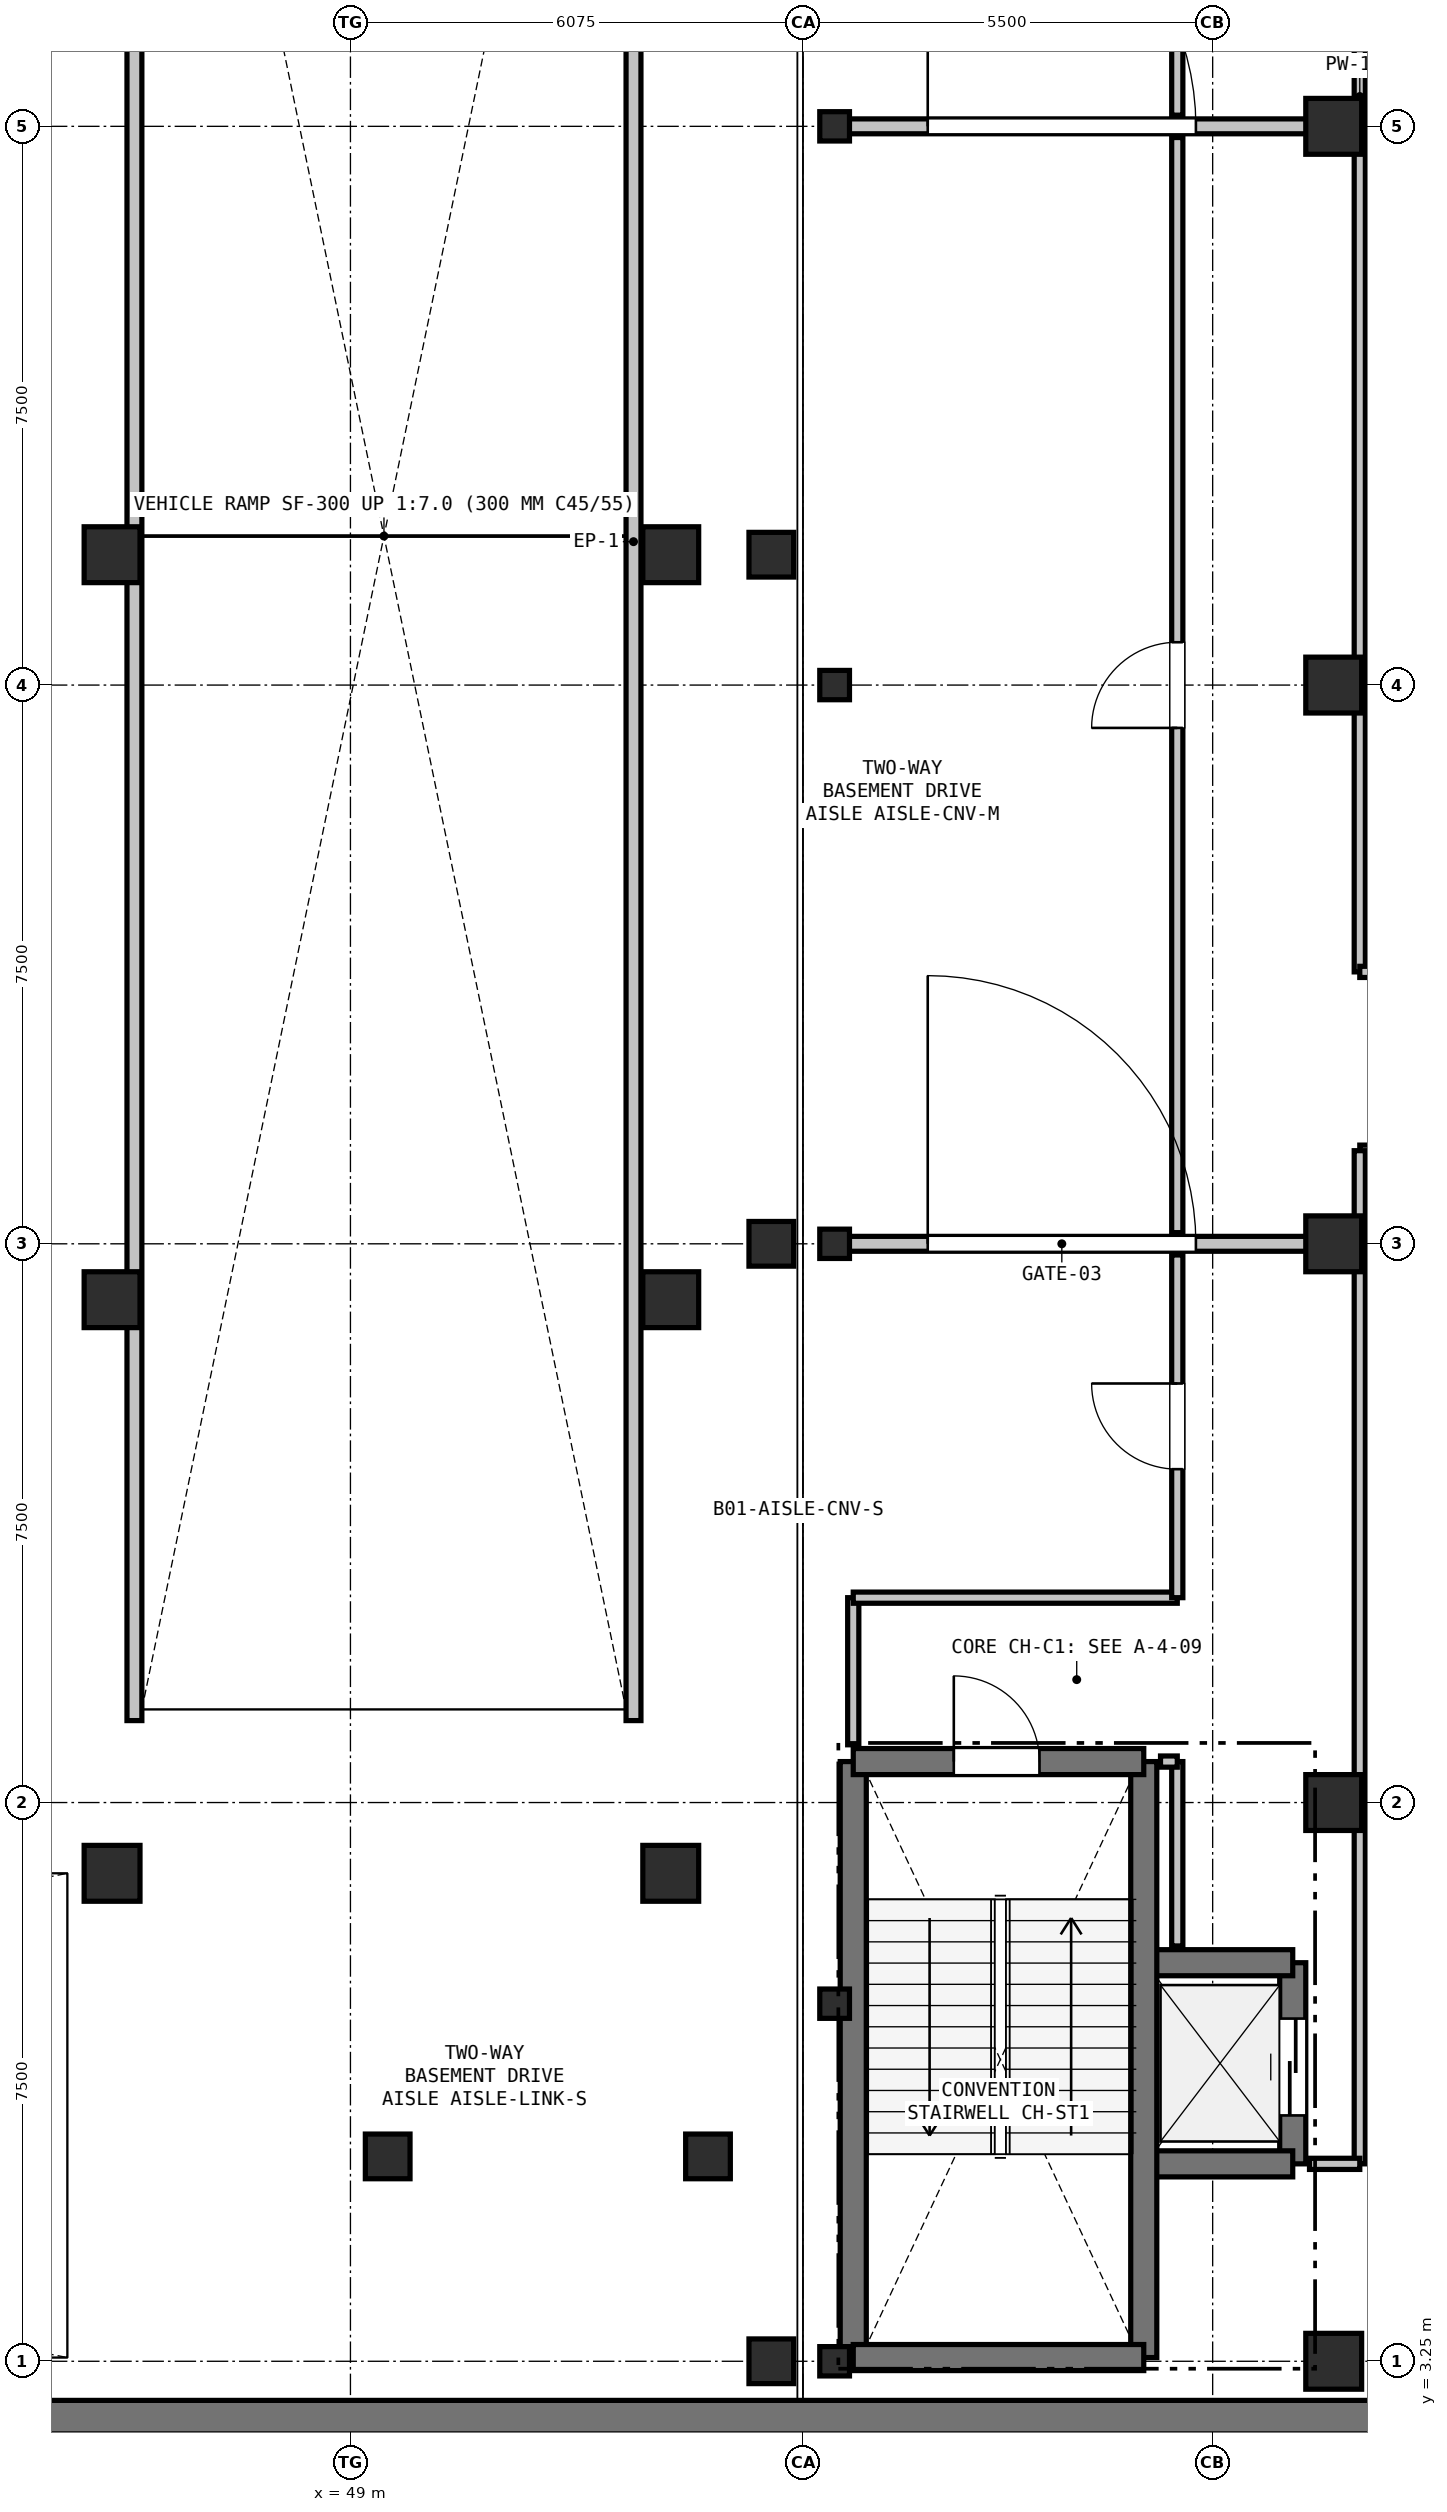
"""IFC4 building model, lengths in metres.
Left out: names, types, materials, properties, quantities, classifications, styles, units other than length and angle.
Written with IfcOpenShell. Run it as: python <this file> out.ifc"""

import sys

from ifc_helpers import new_model, si_unit, direction, frame, frame_2d, origin, origin_2d, place, context, subcontext, project, spatial, rectangle, i_section, extrude, element, fill, save


model = new_model("IFC4")
c1 = context("Model", 3, precision=1e-05, world=origin(), true_north=direction((0.0, 1.0)))
c2 = subcontext(c1, "Body", "Model", "MODEL_VIEW")
j1 = project(units=[si_unit("LENGTHUNIT", "METRE"), si_unit("PLANEANGLEUNIT", "RADIAN")], contexts=[c1])
p1 = place(None, origin())
s1 = spatial("IfcSite", under=j1, at=p1, CompositionType="ELEMENT")
p2 = place(p1, origin())
s2 = spatial("IfcBuilding", under=s1, at=p2, CompositionType="ELEMENT")
p3 = place(p2, frame((0.0, 0.0, -4.5)))
s3 = spatial("IfcBuildingStorey", under=s2, at=p3, CompositionType="ELEMENT", Elevation=-4.5)
p4 = place(p3, frame((-4.5, 2.5, 0.0), z_axis=(0.0, 0.0, 1.0), x_axis=(1.0, 0.0, 0.0)))
e1 = element("IfcWall", 1, at=p4, inside=s3, PredefinedType="USERDEFINED", context=c2, shape_type="SweptSolid", body=[
    extrude(rectangle(XDim=81.5, YDim=0.45, at=frame_2d((40.75, 0.0))), origin(), (0.0, 0.0, 1.0), 4.5),
])
for number, where, z_axis, x_axis in (
    (2, (49.5, 6.0, 0.0), (0.0, 0.0, 1.0), (1.0, 0.0, 0.0)),
    (3, (53.8, 6.0, 0.0), (0.0, 0.0, 1.0), (1.0, 0.0, 0.0)),
):
    element("IfcColumn", number, at=place(p3, frame(where, z_axis=z_axis, x_axis=x_axis)), inside=s3, PredefinedType="COLUMN", context=c2, shape_type="SweptSolid", body=[
        extrude(rectangle(XDim=0.6, YDim=0.6, at=origin_2d()), origin(), (0.0, 0.0, 1.0), 4.5),
    ])
for number, where, z_axis, x_axis in (
    (4, (45.8, 9.8, 0.0), (0.0, 0.0, 1.0), (1.0, 0.0, 0.0)),
    (5, (45.8, 17.5, 0.0), (0.0, 0.0, 1.0), (1.0, 0.0, 0.0)),
    (6, (45.8, 27.5, 0.0), (0.0, 0.0, 1.0), (1.0, 0.0, 0.0)),
    (7, (53.3, 9.8, 0.0), (0.0, 0.0, 1.0), (1.0, 0.0, 0.0)),
    (8, (53.3, 17.5, 0.0), (0.0, 0.0, 1.0), (1.0, 0.0, 0.0)),
    (9, (53.3, 27.5, 0.0), (0.0, 0.0, 1.0), (1.0, 0.0, 0.0)),
):
    element("IfcColumn", number, at=place(p3, frame(where, z_axis=z_axis, x_axis=x_axis)), inside=s3, PredefinedType="COLUMN", context=c2, shape_type="SweptSolid", body=[
        extrude(rectangle(XDim=0.75, YDim=0.75, at=origin_2d()), origin(), (0.0, 0.0, 1.0), 4.5),
    ])
for number, where, z_axis, x_axis in (
    (10, (54.65, 3.25, 0.0), (0.0, 0.0, 1.0), (1.0, 0.0, 0.0)),
    (11, (54.65, 18.25, 0.0), (0.0, 0.0, 1.0), (1.0, 0.0, 0.0)),
    (12, (54.65, 27.5, 0.0), (0.0, 0.0, 1.0), (1.0, 0.0, 0.0)),
):
    element("IfcColumn", number, at=place(p3, frame(where, z_axis=z_axis, x_axis=x_axis)), inside=s3, PredefinedType="COLUMN", context=c2, shape_type="SweptSolid", body=[
        extrude(rectangle(XDim=0.6, YDim=0.6, at=origin_2d()), origin(), (0.0, 0.0, 1.0), 4.2),
    ])
for number, where, z_axis, x_axis in (
    (13, (55.5, 3.25, 0.0), (0.0, 0.0, 1.0), (1.0, 0.0, 0.0)),
    (14, (55.5, 8.05, 0.0), (0.0, 0.0, 1.0), (1.0, 0.0, 0.0)),
    (15, (55.5, 18.25, 0.0), (0.0, 0.0, 1.0), (1.0, 0.0, 0.0)),
    (16, (55.5, 25.75, 0.0), (0.0, 0.0, 1.0), (1.0, 0.0, 0.0)),
    (17, (55.5, 33.25, 0.0), (0.0, 0.0, 1.0), (1.0, 0.0, 0.0)),
):
    element("IfcColumn", number, at=place(p3, frame(where, z_axis=z_axis, x_axis=x_axis)), inside=s3, PredefinedType="COLUMN", context=c2, shape_type="SweptSolid", body=[
        extrude(i_section(OverallWidth=0.399, OverallDepth=0.394, WebThickness=0.023, FlangeThickness=0.037, at=origin_2d()), origin(), (0.0, 0.0, 1.0), 4.5),
    ])
for number, where, z_axis, x_axis in (
    (18, (62.2, 3.25, 0.0), (0.0, 0.0, 1.0), (1.0, 0.0, 0.0)),
    (19, (62.2, 10.75, 0.0), (0.0, 0.0, 1.0), (1.0, 0.0, 0.0)),
    (20, (62.2, 18.25, 0.0), (0.0, 0.0, 1.0), (1.0, 0.0, 0.0)),
    (21, (62.2, 25.75, 0.0), (0.0, 0.0, 1.0), (1.0, 0.0, 0.0)),
    (22, (62.2, 33.25, 0.0), (0.0, 0.0, 1.0), (1.0, 0.0, 0.0)),
):
    element("IfcColumn", number, at=place(p3, frame(where, z_axis=z_axis, x_axis=x_axis)), inside=s3, PredefinedType="COLUMN", context=c2, shape_type="SweptSolid", body=[
        extrude(rectangle(XDim=0.75, YDim=0.75, at=origin_2d()), origin(), (0.0, 0.0, 1.0), 4.5),
    ])
for number, where, z_axis, x_axis in (
    (23, (46.1, 11.85, 0.0), (0.0, 0.0, 1.0), (0.0, 1.0, 0.0)),
    (24, (52.8, 43.5, 0.0), (0.0, 0.0, 1.0), (0.0, -1.0, 0.0)),
):
    element("IfcWall", number, at=place(p3, frame(where, z_axis=z_axis, x_axis=x_axis)), inside=s3, PredefinedType="PARAPET", context=c2, shape_type="SweptSolid", body=[
        extrude(rectangle(XDim=31.65, YDim=0.2, at=frame_2d((15.825, 0.0))), origin(), (0.0, 0.0, 1.0), 5.75),
    ])
p5 = place(p3, frame((61.65, 5.9, 0.0), z_axis=(0.0, 0.0, 1.0), x_axis=(0.0, 1.0, 0.0)))
e25 = element("IfcWall", 25, at=p5, inside=s3, PredefinedType="SHEAR", context=c2, shape_type="SweptSolid", body=[
    extrude(rectangle(XDim=2.7, YDim=0.35, at=frame_2d((1.35, 0.0))), origin(), (0.0, 0.0, 1.0), 4.2),
])
p6 = place(p5, frame((0.65, 0.0, 0.0)))
e26 = element("IfcOpeningElement", 26, at=p6, cuts=e25, PredefinedType="OPENING", context=c2, shape_type="SweptSolid", body=[
    extrude(rectangle(XDim=1.3, YDim=2.2, at=frame_2d((0.65, 1.1))), frame((0.0, 0.185, 0.0), z_axis=(0.0, -1.0, 0.0), x_axis=(1.0, 0.0, 0.0)), (0.0, 0.0, 1.0), 0.37),
])
for number, where, z_axis, x_axis in (
    (27, (59.65, 8.6, 0.0), (0.0, 0.0, 1.0), (1.0, 0.0, 0.0)),
    (28, (59.65, 5.9, 0.0), (0.0, 0.0, 1.0), (1.0, 0.0, 0.0)),
):
    element("IfcWall", number, at=place(p3, frame(where, z_axis=z_axis, x_axis=x_axis)), inside=s3, PredefinedType="SHEAR", context=c2, shape_type="SweptSolid", body=[
        extrude(rectangle(XDim=2.0, YDim=0.35, at=frame_2d((1.0, 0.0))), origin(), (0.0, 0.0, 1.0), 4.2),
    ])
for number, where, z_axis, x_axis in (
    (29, (59.65, 11.3, 0.0), (0.0, 0.0, 1.0), (0.0, -1.0, 0.0)),
    (30, (55.75, 3.3, 0.0), (0.0, 0.0, 1.0), (0.0, 1.0, 0.0)),
):
    element("IfcWall", number, at=place(p3, frame(where, z_axis=z_axis, x_axis=x_axis)), inside=s3, PredefinedType="SHEAR", context=c2, shape_type="SweptSolid", body=[
        extrude(rectangle(XDim=8.0, YDim=0.35, at=frame_2d((4.0, 0.0))), origin(), (0.0, 0.0, 1.0), 4.2),
    ])
p7 = place(p3, frame((55.75, 11.3, 0.0), z_axis=(0.0, 0.0, 1.0), x_axis=(1.0, 0.0, 0.0)))
e31 = element("IfcWall", 31, at=p7, inside=s3, PredefinedType="SHEAR", context=c2, shape_type="SweptSolid", body=[
    extrude(rectangle(XDim=3.9, YDim=0.35, at=frame_2d((1.95, 0.0))), origin(), (0.0, 0.0, 1.0), 4.2),
])
p8 = place(p7, frame((1.35, 0.0, 0.0)))
e32 = element("IfcOpeningElement", 32, at=p8, cuts=e31, PredefinedType="OPENING", context=c2, shape_type="SweptSolid", body=[
    extrude(rectangle(XDim=1.15, YDim=2.15, at=frame_2d((0.575, 1.075))), frame((0.0, 0.185, 0.0), z_axis=(0.0, -1.0, 0.0), x_axis=(1.0, 0.0, 0.0)), (0.0, 0.0, 1.0), 0.37),
])
p9 = place(p3, frame((55.75, 3.3, 0.0), z_axis=(0.0, 0.0, 1.0), x_axis=(1.0, 0.0, 0.0)))
e33 = element("IfcWall", 33, at=p9, inside=s3, PredefinedType="SHEAR", context=c2, shape_type="SweptSolid", body=[
    extrude(rectangle(XDim=3.9, YDim=0.35, at=frame_2d((1.95, 0.0))), origin(), (0.0, 0.0, 1.0), 4.2),
])
p10 = place(p3, frame((55.5, 18.25, 0.0), z_axis=(0.0, 0.0, 1.0), x_axis=(1.0, 0.0, 0.0)))
e34 = element("IfcWall", 34, at=p10, inside=s3, PredefinedType="PARTITIONING", context=c2, shape_type="SweptSolid", body=[
    extrude(rectangle(XDim=6.7, YDim=0.2, at=frame_2d((3.35, 0.0))), origin(), (0.0, 0.0, 1.0), 4.2),
])
p11 = place(p10, frame((1.25, 0.0, 0.0)))
e35 = element("IfcOpeningElement", 35, at=p11, cuts=e34, PredefinedType="OPENING", context=c2, shape_type="SweptSolid", body=[
    extrude(rectangle(XDim=3.6, YDim=2.8, at=frame_2d((1.8, 1.4))), frame((0.0, 0.11, 0.0), z_axis=(0.0, -1.0, 0.0), x_axis=(1.0, 0.0, 0.0)), (0.0, 0.0, 1.0), 0.22),
])
p12 = place(p3, frame((55.5, 33.25, 0.0), z_axis=(0.0, 0.0, 1.0), x_axis=(1.0, 0.0, 0.0)))
e36 = element("IfcWall", 36, at=p12, inside=s3, PredefinedType="PARTITIONING", context=c2, shape_type="SweptSolid", body=[
    extrude(rectangle(XDim=6.7, YDim=0.2, at=frame_2d((3.35, 0.0))), origin(), (0.0, 0.0, 1.0), 4.2),
])
p13 = place(p12, frame((1.25, 0.0, 0.0)))
e37 = element("IfcOpeningElement", 37, at=p13, cuts=e36, PredefinedType="OPENING", context=c2, shape_type="SweptSolid", body=[
    extrude(rectangle(XDim=3.6, YDim=2.8, at=frame_2d((1.8, 1.4))), frame((0.0, 0.11, 0.0), z_axis=(0.0, -1.0, 0.0), x_axis=(1.0, 0.0, 0.0)), (0.0, 0.0, 1.0), 0.22),
])
p14 = place(p3, frame((62.55, 45.4, 0.0), z_axis=(0.0, 0.0, 1.0), x_axis=(0.0, -1.0, 0.0)))
e38 = element("IfcWall", 38, at=p14, inside=s3, PredefinedType="PARTITIONING", context=c2, shape_type="SweptSolid", body=[
    extrude(rectangle(XDim=23.5, YDim=0.15, at=frame_2d((11.75, 0.0))), origin(), (0.0, 0.0, 1.0), 4.2),
])
p15 = place(p3, frame((62.55, 21.9, 0.0), z_axis=(0.0, 0.0, 1.0), x_axis=(1.0, 0.0, 0.0)))
e39 = element("IfcWall", 39, at=p15, inside=s3, PredefinedType="PARTITIONING", context=c2, shape_type="SweptSolid", body=[
    extrude(rectangle(XDim=9.675, YDim=0.15, at=frame_2d((4.837, 0.0))), origin(), (0.0, 0.0, 1.0), 4.2),
])
p16 = place(p15, frame((4.175, 0.0, 0.0)))
e40 = element("IfcOpeningElement", 40, at=p16, cuts=e39, PredefinedType="OPENING", context=c2, shape_type="SweptSolid", body=[
    extrude(rectangle(XDim=1.15, YDim=2.15, at=frame_2d((0.575, 1.075))), frame((0.0, 0.085, 0.0), z_axis=(0.0, -1.0, 0.0), x_axis=(1.0, 0.0, 0.0)), (0.0, 0.0, 1.0), 0.17),
])
p17 = place(p3, frame((76.35, 19.5, 0.0), z_axis=(0.0, 0.0, 1.0), x_axis=(-1.0, 0.0, 0.0)))
e41 = element("IfcWall", 41, at=p17, inside=s3, PredefinedType="PARTITIONING", context=c2, shape_type="SweptSolid", body=[
    extrude(rectangle(XDim=13.8, YDim=0.15, at=frame_2d((6.9, 0.0))), origin(), (0.0, 0.0, 1.0), 4.2),
])
p18 = place(p3, frame((62.55, 19.5, 0.0), z_axis=(0.0, 0.0, 1.0), x_axis=(0.0, -1.0, 0.0)))
e42 = element("IfcWall", 42, at=p18, inside=s3, PredefinedType="PARTITIONING", context=c2, shape_type="SweptSolid", body=[
    extrude(rectangle(XDim=13.6, YDim=0.15, at=frame_2d((6.8, 0.0))), origin(), (0.0, 0.0, 1.0), 4.2),
])
p19 = place(p3, frame((62.55, 5.9, 0.0), z_axis=(0.0, 0.0, 1.0), x_axis=(-1.0, 0.0, 0.0)))
e43 = element("IfcWall", 43, at=p19, inside=s3, PredefinedType="PARTITIONING", context=c2, shape_type="SweptSolid", body=[
    extrude(rectangle(XDim=0.675, YDim=0.15, at=frame_2d((0.337, 0.0))), origin(), (0.0, 0.0, 1.0), 4.2),
])
p20 = place(p3, frame((60.1, 8.825, 0.0), z_axis=(0.0, 0.0, 1.0), x_axis=(0.0, 1.0, 0.0)))
e44 = element("IfcWall", 44, at=p20, inside=s3, PredefinedType="PARTITIONING", context=c2, shape_type="SweptSolid", body=[
    extrude(rectangle(XDim=2.475, YDim=0.15, at=frame_2d((1.238, 0.0))), origin(), (0.0, 0.0, 1.0), 4.2),
])
p21 = place(p3, frame((60.1, 11.3, 0.0), z_axis=(0.0, 0.0, 1.0), x_axis=(-1.0, 0.0, 0.0)))
e45 = element("IfcWall", 45, at=p21, inside=s3, PredefinedType="PARTITIONING", context=c2, shape_type="SweptSolid", body=[
    extrude(rectangle(XDim=0.225, YDim=0.15, at=frame_2d((0.113, 0.0))), origin(), (0.0, 0.0, 1.0), 4.2),
])
p22 = place(p3, frame((55.75, 11.525, 0.0), z_axis=(0.0, 0.0, 1.0), x_axis=(0.0, 1.0, 0.0)))
e46 = element("IfcWall", 46, at=p22, inside=s3, PredefinedType="PARTITIONING", context=c2, shape_type="SweptSolid", body=[
    extrude(rectangle(XDim=1.975, YDim=0.15, at=frame_2d((0.988, 0.0))), origin(), (0.0, 0.0, 1.0), 4.2),
])
p23 = place(p3, frame((55.75, 13.5, 0.0), z_axis=(0.0, 0.0, 1.0), x_axis=(1.0, 0.0, 0.0)))
e47 = element("IfcWall", 47, at=p23, inside=s3, PredefinedType="PARTITIONING", context=c2, shape_type="SweptSolid", body=[
    extrude(rectangle(XDim=4.35, YDim=0.15, at=frame_2d((2.175, 0.0))), origin(), (0.0, 0.0, 1.0), 4.2),
])
p24 = place(p3, frame((60.1, 13.5, 0.0), z_axis=(0.0, 0.0, 1.0), x_axis=(0.0, 1.0, 0.0)))
e48 = element("IfcWall", 48, at=p24, inside=s3, PredefinedType="PARTITIONING", context=c2, shape_type="SweptSolid", body=[
    extrude(rectangle(XDim=4.6, YDim=0.15, at=frame_2d((2.3, 0.0))), origin(), (0.0, 0.0, 1.0), 4.2),
])
p25 = place(p24, frame((1.725, 0.0, 0.0)))
e49 = element("IfcOpeningElement", 49, at=p25, cuts=e48, PredefinedType="OPENING", context=c2, shape_type="SweptSolid", body=[
    extrude(rectangle(XDim=1.15, YDim=2.15, at=frame_2d((0.575, 1.075))), frame((0.0, 0.085, 0.0), z_axis=(0.0, -1.0, 0.0), x_axis=(1.0, 0.0, 0.0)), (0.0, 0.0, 1.0), 0.17),
])
p26 = place(p3, frame((60.1, 18.4, 0.0), z_axis=(0.0, 0.0, 1.0), x_axis=(0.0, 1.0, 0.0)))
e50 = element("IfcWall", 50, at=p26, inside=s3, PredefinedType="PARTITIONING", context=c2, shape_type="SweptSolid", body=[
    extrude(rectangle(XDim=14.7, YDim=0.15, at=frame_2d((7.35, 0.0))), origin(), (0.0, 0.0, 1.0), 4.2),
])
p27 = place(p26, frame((6.775, 0.0, 0.0)))
e51 = element("IfcOpeningElement", 51, at=p27, cuts=e50, PredefinedType="OPENING", context=c2, shape_type="SweptSolid", body=[
    extrude(rectangle(XDim=1.15, YDim=2.15, at=frame_2d((0.575, 1.075))), frame((0.0, 0.085, 0.0), z_axis=(0.0, -1.0, 0.0), x_axis=(1.0, 0.0, 0.0)), (0.0, 0.0, 1.0), 0.17),
])
p28 = place(p3, frame((60.1, 33.4, 0.0), z_axis=(0.0, 0.0, 1.0), x_axis=(0.0, 1.0, 0.0)))
e52 = element("IfcWall", 52, at=p28, inside=s3, PredefinedType="PARTITIONING", context=c2, shape_type="SweptSolid", body=[
    extrude(rectangle(XDim=4.6, YDim=0.15, at=frame_2d((2.3, 0.0))), origin(), (0.0, 0.0, 1.0), 4.2),
])
p29 = place(p28, frame((1.725, 0.0, 0.0)))
e53 = element("IfcOpeningElement", 53, at=p29, cuts=e52, PredefinedType="OPENING", context=c2, shape_type="SweptSolid", body=[
    extrude(rectangle(XDim=1.15, YDim=2.15, at=frame_2d((0.575, 1.075))), frame((0.0, 0.085, 0.0), z_axis=(0.0, -1.0, 0.0), x_axis=(1.0, 0.0, 0.0)), (0.0, 0.0, 1.0), 0.17),
])
p30 = place(p6, origin())
e54 = element("IfcDoor", 54, at=p30, inside=s3, OperationType="SLIDING_TO_LEFT", PredefinedType="DOOR", context=c2, shape_type="SweptSolid", body=[
    extrude(rectangle(XDim=1.3, YDim=2.2, at=frame_2d((0.65, 1.1))), frame((0.0, 0.025, 0.0), z_axis=(0.0, -1.0, 0.0), x_axis=(1.0, 0.0, 0.0)), (0.0, 0.0, 1.0), 0.05),
])
fill(e26, e54)
p31 = place(p8, origin())
e55 = element("IfcDoor", 55, at=p31, inside=s3, OperationType="SINGLE_SWING_LEFT", PredefinedType="DOOR", context=c2, shape_type="SweptSolid", body=[
    extrude(rectangle(XDim=1.15, YDim=2.15, at=frame_2d((0.575, 1.075))), frame((0.0, 0.025, 0.0), z_axis=(0.0, -1.0, 0.0), x_axis=(1.0, 0.0, 0.0)), (0.0, 0.0, 1.0), 0.05),
])
fill(e32, e55)
p32 = place(p11, origin())
e56 = element("IfcDoor", 56, at=p32, inside=s3, OperationType="ROLLINGUP", PredefinedType="GATE", context=c2, shape_type="SweptSolid", body=[
    extrude(rectangle(XDim=3.6, YDim=2.8, at=frame_2d((1.8, 1.4))), frame((0.0, 0.025, 0.0), z_axis=(0.0, -1.0, 0.0), x_axis=(1.0, 0.0, 0.0)), (0.0, 0.0, 1.0), 0.05),
])
fill(e35, e56)
p33 = place(p13, origin())
e57 = element("IfcDoor", 57, at=p33, inside=s3, OperationType="ROLLINGUP", PredefinedType="GATE", context=c2, shape_type="SweptSolid", body=[
    extrude(rectangle(XDim=3.6, YDim=2.8, at=frame_2d((1.8, 1.4))), frame((0.0, 0.025, 0.0), z_axis=(0.0, -1.0, 0.0), x_axis=(1.0, 0.0, 0.0)), (0.0, 0.0, 1.0), 0.05),
])
fill(e37, e57)
p34 = place(p25, origin())
e58 = element("IfcDoor", 58, at=p34, inside=s3, OperationType="SINGLE_SWING_RIGHT", PredefinedType="DOOR", context=c2, shape_type="SweptSolid", body=[
    extrude(rectangle(XDim=1.15, YDim=2.15, at=frame_2d((0.575, 1.075))), frame((0.0, 0.025, 0.0), z_axis=(0.0, -1.0, 0.0), x_axis=(1.0, 0.0, 0.0)), (0.0, 0.0, 1.0), 0.05),
])
fill(e49, e58)
p35 = place(p27, origin())
e59 = element("IfcDoor", 59, at=p35, inside=s3, OperationType="SINGLE_SWING_LEFT", PredefinedType="DOOR", context=c2, shape_type="SweptSolid", body=[
    extrude(rectangle(XDim=1.15, YDim=2.15, at=frame_2d((0.575, 1.075))), frame((0.0, 0.025, 0.0), z_axis=(0.0, -1.0, 0.0), x_axis=(1.0, 0.0, 0.0)), (0.0, 0.0, 1.0), 0.05),
])
fill(e51, e59)
save(model, sys.argv[1])
